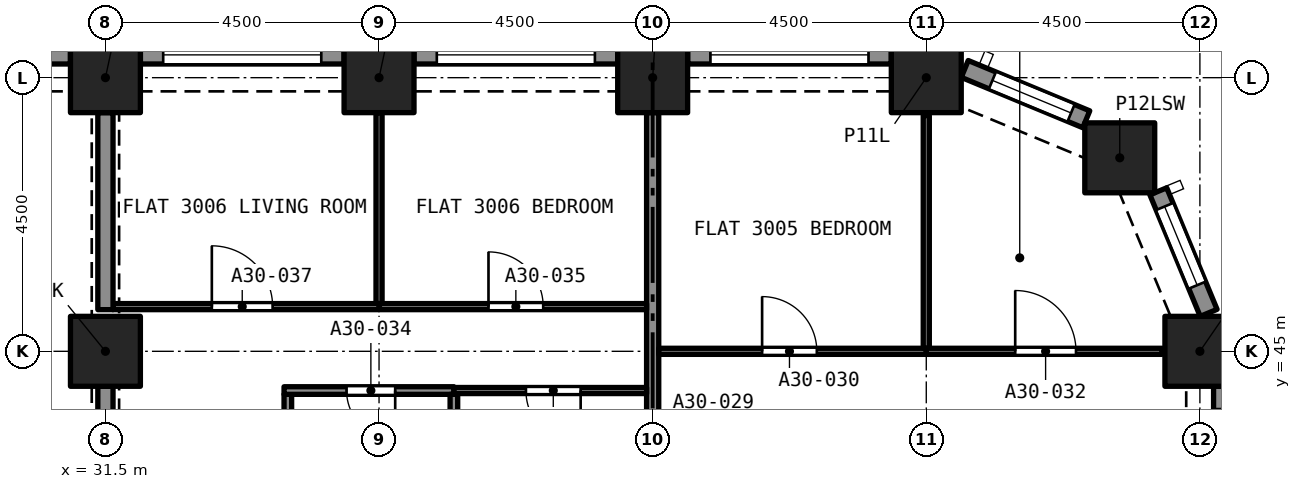
"""IFC4 building model, lengths in metres.
Left out: names, types, materials, properties, quantities, classifications, styles, units other than length and angle.
Written with IfcOpenShell. Run it as: python <this file> out.ifc"""

import sys

from ifc_helpers import new_model, si_unit, direction, frame, frame_2d, origin, origin_2d, place, context, subcontext, project, spatial, rectangle, extrude, element, fill, save


model = new_model("IFC4")
c1 = context("Model", 3, precision=1e-05, world=origin(), true_north=direction((0.0, 1.0)))
c2 = subcontext(c1, "Body", "Model", "MODEL_VIEW")
j1 = project(units=[si_unit("LENGTHUNIT", "METRE"), si_unit("PLANEANGLEUNIT", "RADIAN")], contexts=[c1])
p1 = place(None, origin())
s1 = spatial("IfcSite", under=j1, at=p1, CompositionType="ELEMENT")
p2 = place(p1, origin())
s2 = spatial("IfcBuilding", under=s1, at=p2, CompositionType="ELEMENT")
p3 = place(p2, frame((0.0, 0.0, 108.8)))
s3 = spatial("IfcBuildingStorey", under=s2, at=p3, CompositionType="ELEMENT", Elevation=108.8)
for number, where, z_axis, x_axis in (
    (1, (31.5, 45.0, 0.0), (0.0, 0.0, 1.0), (1.0, 0.0, 0.0)),
    (2, (49.5, 45.0, 0.0), (0.0, 0.0, 1.0), (1.0, 0.0, 0.0)),
    (3, (48.182, 48.182, 0.0), (0.0, 0.0, 1.0), (1.0, 0.0, 0.0)),
    (4, (31.5, 49.5, 0.0), (0.0, 0.0, 1.0), (1.0, 0.0, 0.0)),
    (5, (36.0, 49.5, 0.0), (0.0, 0.0, 1.0), (1.0, 0.0, 0.0)),
    (6, (40.5, 49.5, 0.0), (0.0, 0.0, 1.0), (1.0, 0.0, 0.0)),
    (7, (45.0, 49.5, 0.0), (0.0, 0.0, 1.0), (1.0, 0.0, 0.0)),
):
    element("IfcColumn", number, at=place(p3, frame(where, z_axis=z_axis, x_axis=x_axis)), inside=s3, PredefinedType="COLUMN", context=c2, shape_type="SweptSolid", body=[
        extrude(rectangle(XDim=1.15, YDim=1.15, at=origin_2d()), origin(), (0.0, 0.0, 1.0), 3.2),
    ])
p4 = place(p3, frame((49.875, 44.425, 0.0), z_axis=(0.0, 0.0, 1.0), x_axis=(0.0, -1.0, 0.0)))
e8 = element("IfcWall", 8, at=p4, inside=s3, PredefinedType="SOLIDWALL", context=c2, shape_type="SweptSolid", body=[
    extrude(rectangle(XDim=3.35, YDim=0.3, at=frame_2d((1.675, 0.0))), origin(), (0.0, 0.0, 1.0), 3.2),
])
p5 = place(p4, frame((0.375, 0.0, 0.45)))
e9 = element("IfcOpeningElement", 9, at=p5, cuts=e8, PredefinedType="OPENING", context=c2, shape_type="SweptSolid", body=[
    extrude(rectangle(XDim=2.6, YDim=1.95, at=frame_2d((1.3, 0.975))), frame((0.0, 0.16, 0.0), z_axis=(0.0, -1.0, 0.0), x_axis=(1.0, 0.0, 0.0)), (0.0, 0.0, 1.0), 0.32),
])
p6 = place(p3, frame((48.816, 47.631, 0.0), z_axis=(0.0, 0.0, 1.0), x_axis=(0.382723818695, -0.923862802911, 0.0)))
e10 = element("IfcWall", 10, at=p6, inside=s3, PredefinedType="SOLIDWALL", context=c2, shape_type="SweptSolid", body=[
    extrude(rectangle(XDim=2.164, YDim=0.3, at=frame_2d((1.082, 0.0))), origin(), (0.0, 0.0, 1.0), 3.2),
])
p7 = place(p6, frame((0.271, 0.0, 0.45)))
e11 = element("IfcOpeningElement", 11, at=p7, cuts=e10, PredefinedType="OPENING", context=c2, shape_type="SweptSolid", body=[
    extrude(rectangle(XDim=1.4, YDim=1.95, at=frame_2d((0.7, 0.975))), frame((0.0, 0.16, 0.0), z_axis=(0.0, -1.0, 0.0), x_axis=(1.0, 0.0, 0.0)), (0.0, 0.0, 1.0), 0.32),
])
p8 = place(p3, frame((45.632, 49.644, 0.0), z_axis=(0.0, 0.0, 1.0), x_axis=(0.923862802911, -0.382723818695, 0.0)))
e12 = element("IfcWall", 12, at=p8, inside=s3, PredefinedType="SOLIDWALL", context=c2, shape_type="SweptSolid", body=[
    extrude(rectangle(XDim=2.164, YDim=0.3, at=frame_2d((1.082, 0.0))), origin(), (0.0, 0.0, 1.0), 3.2),
])
p9 = place(p8, frame((0.493, 0.0, 0.45)))
e13 = element("IfcOpeningElement", 13, at=p9, cuts=e12, PredefinedType="OPENING", context=c2, shape_type="SweptSolid", body=[
    extrude(rectangle(XDim=1.4, YDim=1.95, at=frame_2d((0.7, 0.975))), frame((0.0, 0.16, 0.0), z_axis=(0.0, -1.0, 0.0), x_axis=(1.0, 0.0, 0.0)), (0.0, 0.0, 1.0), 0.32),
])
p10 = place(p3, frame((41.075, 49.875, 0.0), z_axis=(0.0, 0.0, 1.0), x_axis=(1.0, 0.0, 0.0)))
e14 = element("IfcWall", 14, at=p10, inside=s3, PredefinedType="SOLIDWALL", context=c2, shape_type="SweptSolid", body=[
    extrude(rectangle(XDim=3.35, YDim=0.3, at=frame_2d((1.675, 0.0))), origin(), (0.0, 0.0, 1.0), 3.2),
])
p11 = place(p10, frame((0.375, 0.0, 0.45)))
e15 = element("IfcOpeningElement", 15, at=p11, cuts=e14, PredefinedType="OPENING", context=c2, shape_type="SweptSolid", body=[
    extrude(rectangle(XDim=2.6, YDim=1.95, at=frame_2d((1.3, 0.975))), frame((0.0, 0.16, 0.0), z_axis=(0.0, -1.0, 0.0), x_axis=(1.0, 0.0, 0.0)), (0.0, 0.0, 1.0), 0.32),
])
p12 = place(p3, frame((36.575, 49.875, 0.0), z_axis=(0.0, 0.0, 1.0), x_axis=(1.0, 0.0, 0.0)))
e16 = element("IfcWall", 16, at=p12, inside=s3, PredefinedType="SOLIDWALL", context=c2, shape_type="SweptSolid", body=[
    extrude(rectangle(XDim=3.35, YDim=0.3, at=frame_2d((1.675, 0.0))), origin(), (0.0, 0.0, 1.0), 3.2),
])
p13 = place(p12, frame((0.375, 0.0, 0.45)))
e17 = element("IfcOpeningElement", 17, at=p13, cuts=e16, PredefinedType="OPENING", context=c2, shape_type="SweptSolid", body=[
    extrude(rectangle(XDim=2.6, YDim=1.95, at=frame_2d((1.3, 0.975))), frame((0.0, 0.16, 0.0), z_axis=(0.0, -1.0, 0.0), x_axis=(1.0, 0.0, 0.0)), (0.0, 0.0, 1.0), 0.32),
])
p14 = place(p3, frame((32.075, 49.875, 0.0), z_axis=(0.0, 0.0, 1.0), x_axis=(1.0, 0.0, 0.0)))
e18 = element("IfcWall", 18, at=p14, inside=s3, PredefinedType="SOLIDWALL", context=c2, shape_type="SweptSolid", body=[
    extrude(rectangle(XDim=3.35, YDim=0.3, at=frame_2d((1.675, 0.0))), origin(), (0.0, 0.0, 1.0), 3.2),
])
p15 = place(p14, frame((0.375, 0.0, 0.45)))
e19 = element("IfcOpeningElement", 19, at=p15, cuts=e18, PredefinedType="OPENING", context=c2, shape_type="SweptSolid", body=[
    extrude(rectangle(XDim=2.6, YDim=1.95, at=frame_2d((1.3, 0.975))), frame((0.0, 0.16, 0.0), z_axis=(0.0, -1.0, 0.0), x_axis=(1.0, 0.0, 0.0)), (0.0, 0.0, 1.0), 0.32),
])
p16 = place(p3, frame((27.575, 49.875, 0.0), z_axis=(0.0, 0.0, 1.0), x_axis=(1.0, 0.0, 0.0)))
e20 = element("IfcWall", 20, at=p16, inside=s3, PredefinedType="SOLIDWALL", context=c2, shape_type="SweptSolid", body=[
    extrude(rectangle(XDim=3.35, YDim=0.3, at=frame_2d((1.675, 0.0))), origin(), (0.0, 0.0, 1.0), 3.2),
])
p17 = place(p16, frame((0.375, 0.0, 0.45)))
e21 = element("IfcOpeningElement", 21, at=p17, cuts=e20, PredefinedType="OPENING", context=c2, shape_type="SweptSolid", body=[
    extrude(rectangle(XDim=2.6, YDim=1.95, at=frame_2d((1.3, 0.975))), frame((0.0, 0.16, 0.0), z_axis=(0.0, -1.0, 0.0), x_axis=(1.0, 0.0, 0.0)), (0.0, 0.0, 1.0), 0.32),
])
p18 = place(p3, frame((40.5, 40.35, 0.0), z_axis=(0.0, 0.0, 1.0), x_axis=(0.0, 1.0, 0.0)))
e22 = element("IfcWall", 22, at=p18, inside=s3, PredefinedType="PARTITIONING", context=c2, shape_type="SweptSolid", body=[
    extrude(rectangle(XDim=8.575, YDim=0.2, at=frame_2d((4.288, 0.0))), origin(), (0.0, 0.0, 1.0), 2.9),
])
p19 = place(p3, frame((40.6, 45.0, 0.0), z_axis=(0.0, 0.0, 1.0), x_axis=(1.0, 0.0, 0.0)))
e23 = element("IfcWall", 23, at=p19, inside=s3, PredefinedType="PARTITIONING", context=c2, shape_type="SweptSolid", body=[
    extrude(rectangle(XDim=4.4, YDim=0.1, at=frame_2d((2.2, 0.0))), origin(), (0.0, 0.0, 1.0), 2.9),
])
p20 = place(p19, frame((1.7, 0.0, 0.0)))
e24 = element("IfcOpeningElement", 24, at=p20, cuts=e23, PredefinedType="OPENING", context=c2, shape_type="SweptSolid", body=[
    extrude(rectangle(XDim=0.9, YDim=2.1, at=frame_2d((0.45, 1.05))), frame((0.0, 0.06, 0.0), z_axis=(0.0, -1.0, 0.0), x_axis=(1.0, 0.0, 0.0)), (0.0, 0.0, 1.0), 0.12),
])
p21 = place(p3, frame((45.0, 45.05, 0.0), z_axis=(0.0, 0.0, 1.0), x_axis=(0.0, 1.0, 0.0)))
e25 = element("IfcWall", 25, at=p21, inside=s3, PredefinedType="PARTITIONING", context=c2, shape_type="SweptSolid", body=[
    extrude(rectangle(XDim=3.828, YDim=0.1, at=frame_2d((1.914, 0.0))), origin(), (0.0, 0.0, 1.0), 2.9),
])
p22 = place(p3, frame((45.0, 45.0, 0.0), z_axis=(0.0, 0.0, 1.0), x_axis=(1.0, 0.0, 0.0)))
e26 = element("IfcWall", 26, at=p22, inside=s3, PredefinedType="PARTITIONING", context=c2, shape_type="SweptSolid", body=[
    extrude(rectangle(XDim=3.878, YDim=0.1, at=frame_2d((1.939, 0.0))), origin(), (0.0, 0.0, 1.0), 2.9),
])
p23 = place(p22, frame((1.462, 0.0, 0.0)))
e27 = element("IfcOpeningElement", 27, at=p23, cuts=e26, PredefinedType="OPENING", context=c2, shape_type="SweptSolid", body=[
    extrude(rectangle(XDim=1.0, YDim=2.1, at=frame_2d((0.5, 1.05))), frame((0.0, 0.06, 0.0), z_axis=(0.0, -1.0, 0.0), x_axis=(1.0, 0.0, 0.0)), (0.0, 0.0, 1.0), 0.12),
])
p24 = place(p3, frame((34.5, 40.425, 0.0), z_axis=(0.0, 0.0, 1.0), x_axis=(0.0, 1.0, 0.0)))
e28 = element("IfcWall", 28, at=p24, inside=s3, PredefinedType="PARTITIONING", context=c2, shape_type="SweptSolid", body=[
    extrude(rectangle(XDim=3.867, YDim=0.125, at=frame_2d((1.934, 0.0))), origin(), (0.0, 0.0, 1.0), 2.9),
])
p25 = place(p3, frame((37.231, 44.355, 0.0), z_axis=(0.0, 0.0, 1.0), x_axis=(-1.0, 0.0, 0.0)))
e29 = element("IfcWall", 29, at=p25, inside=s3, PredefinedType="PARTITIONING", context=c2, shape_type="SweptSolid", body=[
    extrude(rectangle(XDim=2.794, YDim=0.125, at=frame_2d((1.397, 0.0))), origin(), (0.0, 0.0, 1.0), 2.9),
])
p26 = place(p25, frame((0.966, 0.0, 0.0)))
e30 = element("IfcOpeningElement", 30, at=p26, cuts=e29, PredefinedType="OPENING", context=c2, shape_type="SweptSolid", body=[
    extrude(rectangle(XDim=0.8, YDim=2.1, at=frame_2d((0.4, 1.05))), frame((0.0, 0.073, 0.0), z_axis=(0.0, -1.0, 0.0), x_axis=(1.0, 0.0, 0.0)), (0.0, 0.0, 1.0), 0.145),
])
p27 = place(p3, frame((37.231, 40.35, 0.0), z_axis=(0.0, 0.0, 1.0), x_axis=(0.0, 1.0, 0.0)))
e31 = element("IfcWall", 31, at=p27, inside=s3, PredefinedType="PARTITIONING", context=c2, shape_type="SweptSolid", body=[
    extrude(rectangle(XDim=3.942, YDim=0.125, at=frame_2d((1.971, 0.0))), origin(), (0.0, 0.0, 1.0), 2.9),
])
p28 = place(p3, frame((36.0, 45.735, 0.0), z_axis=(0.0, 0.0, 1.0), x_axis=(1.0, 0.0, 0.0)))
e32 = element("IfcWall", 32, at=p28, inside=s3, PredefinedType="PARTITIONING", context=c2, shape_type="SweptSolid", body=[
    extrude(rectangle(XDim=4.4, YDim=0.1, at=frame_2d((2.2, 0.0))), origin(), (0.0, 0.0, 1.0), 2.9),
])
p29 = place(p28, frame((1.8, 0.0, 0.0)))
e33 = element("IfcOpeningElement", 33, at=p29, cuts=e32, PredefinedType="OPENING", context=c2, shape_type="SweptSolid", body=[
    extrude(rectangle(XDim=0.9, YDim=2.1, at=frame_2d((0.45, 1.05))), frame((0.0, 0.06, 0.0), z_axis=(0.0, -1.0, 0.0), x_axis=(1.0, 0.0, 0.0)), (0.0, 0.0, 1.0), 0.12),
])
p30 = place(p3, frame((36.0, 45.785, 0.0), z_axis=(0.0, 0.0, 1.0), x_axis=(0.0, 1.0, 0.0)))
e34 = element("IfcWall", 34, at=p30, inside=s3, PredefinedType="PARTITIONING", context=c2, shape_type="SweptSolid", body=[
    extrude(rectangle(XDim=3.14, YDim=0.1, at=frame_2d((1.57, 0.0))), origin(), (0.0, 0.0, 1.0), 2.9),
])
p31 = place(p3, frame((40.4, 44.355, 0.0), z_axis=(0.0, 0.0, 1.0), x_axis=(-1.0, 0.0, 0.0)))
e35 = element("IfcWall", 35, at=p31, inside=s3, PredefinedType="PARTITIONING", context=c2, shape_type="SweptSolid", body=[
    extrude(rectangle(XDim=3.168, YDim=0.1, at=frame_2d((1.584, 0.0))), origin(), (0.0, 0.0, 1.0), 2.9),
])
p32 = place(p31, frame((1.084, 0.0, 0.0)))
e36 = element("IfcOpeningElement", 36, at=p32, cuts=e35, PredefinedType="OPENING", context=c2, shape_type="SweptSolid", body=[
    extrude(rectangle(XDim=0.9, YDim=2.1, at=frame_2d((0.45, 1.05))), frame((0.0, 0.06, 0.0), z_axis=(0.0, -1.0, 0.0), x_axis=(1.0, 0.0, 0.0)), (0.0, 0.0, 1.0), 0.12),
])
p33 = place(p3, frame((31.625, 45.735, 0.0), z_axis=(0.0, 0.0, 1.0), x_axis=(1.0, 0.0, 0.0)))
e37 = element("IfcWall", 37, at=p33, inside=s3, PredefinedType="PARTITIONING", context=c2, shape_type="SweptSolid", body=[
    extrude(rectangle(XDim=4.375, YDim=0.1, at=frame_2d((2.188, 0.0))), origin(), (0.0, 0.0, 1.0), 2.9),
])
p34 = place(p33, frame((1.625, 0.0, 0.0)))
e38 = element("IfcOpeningElement", 38, at=p34, cuts=e37, PredefinedType="OPENING", context=c2, shape_type="SweptSolid", body=[
    extrude(rectangle(XDim=1.0, YDim=2.1, at=frame_2d((0.5, 1.05))), frame((0.0, 0.06, 0.0), z_axis=(0.0, -1.0, 0.0), x_axis=(1.0, 0.0, 0.0)), (0.0, 0.0, 1.0), 0.12),
])
p35 = place(p3, frame((31.5, 41.075, 0.0), z_axis=(0.0, 0.0, 1.0), x_axis=(0.0, 1.0, 0.0)))
e39 = element("IfcWall", 39, at=p35, inside=s3, PredefinedType="PARTITIONING", context=c2, shape_type="SweptSolid", body=[
    extrude(rectangle(XDim=3.35, YDim=0.25, at=frame_2d((1.675, 0.0))), origin(), (0.0, 0.0, 1.0), 2.38),
])
p36 = place(p3, frame((31.5, 45.685, 0.0), z_axis=(0.0, 0.0, 1.0), x_axis=(0.0, 1.0, 0.0)))
e40 = element("IfcWall", 40, at=p36, inside=s3, PredefinedType="PARTITIONING", context=c2, shape_type="SweptSolid", body=[
    extrude(rectangle(XDim=3.24, YDim=0.25, at=frame_2d((1.62, 0.0))), origin(), (0.0, 0.0, 1.0), 2.38),
])
p37 = place(p7, origin())
e41 = element("IfcWindow", 41, at=p37, inside=s3, PartitioningType="SINGLE_PANEL", PredefinedType="WINDOW", context=c2, shape_type="SweptSolid", body=[
    extrude(rectangle(XDim=1.4, YDim=1.95, at=frame_2d((0.7, 0.975))), frame((0.0, 0.03, 0.0), z_axis=(0.0, -1.0, 0.0), x_axis=(1.0, 0.0, 0.0)), (0.0, 0.0, 1.0), 0.06),
])
fill(e11, e41)
p38 = place(p9, origin())
e42 = element("IfcWindow", 42, at=p38, inside=s3, PartitioningType="SINGLE_PANEL", PredefinedType="WINDOW", context=c2, shape_type="SweptSolid", body=[
    extrude(rectangle(XDim=1.4, YDim=1.95, at=frame_2d((0.7, 0.975))), frame((0.0, 0.03, 0.0), z_axis=(0.0, -1.0, 0.0), x_axis=(1.0, 0.0, 0.0)), (0.0, 0.0, 1.0), 0.06),
])
fill(e13, e42)
p39 = place(p11, origin())
e43 = element("IfcWindow", 43, at=p39, inside=s3, PartitioningType="SINGLE_PANEL", PredefinedType="WINDOW", context=c2, shape_type="SweptSolid", body=[
    extrude(rectangle(XDim=2.6, YDim=1.95, at=frame_2d((1.3, 0.975))), frame((0.0, 0.03, 0.0), z_axis=(0.0, -1.0, 0.0), x_axis=(1.0, 0.0, 0.0)), (0.0, 0.0, 1.0), 0.06),
])
fill(e15, e43)
p40 = place(p13, origin())
e44 = element("IfcWindow", 44, at=p40, inside=s3, PartitioningType="SINGLE_PANEL", PredefinedType="WINDOW", context=c2, shape_type="SweptSolid", body=[
    extrude(rectangle(XDim=2.6, YDim=1.95, at=frame_2d((1.3, 0.975))), frame((0.0, 0.03, 0.0), z_axis=(0.0, -1.0, 0.0), x_axis=(1.0, 0.0, 0.0)), (0.0, 0.0, 1.0), 0.06),
])
fill(e17, e44)
p41 = place(p15, origin())
e45 = element("IfcWindow", 45, at=p41, inside=s3, PartitioningType="SINGLE_PANEL", PredefinedType="WINDOW", context=c2, shape_type="SweptSolid", body=[
    extrude(rectangle(XDim=2.6, YDim=1.95, at=frame_2d((1.3, 0.975))), frame((0.0, 0.03, 0.0), z_axis=(0.0, -1.0, 0.0), x_axis=(1.0, 0.0, 0.0)), (0.0, 0.0, 1.0), 0.06),
])
fill(e19, e45)
p42 = place(p20, origin())
e46 = element("IfcDoor", 46, at=p42, inside=s3, OperationType="SINGLE_SWING_LEFT", PredefinedType="DOOR", context=c2, shape_type="SweptSolid", body=[
    extrude(rectangle(XDim=0.9, YDim=2.1, at=frame_2d((0.45, 1.05))), frame((0.0, 0.025, 0.0), z_axis=(0.0, -1.0, 0.0), x_axis=(1.0, 0.0, 0.0)), (0.0, 0.0, 1.0), 0.05),
])
fill(e24, e46)
p43 = place(p23, origin())
e47 = element("IfcDoor", 47, at=p43, inside=s3, OperationType="SINGLE_SWING_RIGHT", PredefinedType="DOOR", context=c2, shape_type="SweptSolid", body=[
    extrude(rectangle(XDim=1.0, YDim=2.1, at=frame_2d((0.5, 1.05))), frame((0.0, 0.025, 0.0), z_axis=(0.0, -1.0, 0.0), x_axis=(1.0, 0.0, 0.0)), (0.0, 0.0, 1.0), 0.05),
])
fill(e27, e47)
p44 = place(p26, origin())
e48 = element("IfcDoor", 48, at=p44, inside=s3, OperationType="SINGLE_SWING_LEFT", PredefinedType="DOOR", context=c2, shape_type="SweptSolid", body=[
    extrude(rectangle(XDim=0.8, YDim=2.1, at=frame_2d((0.4, 1.05))), frame((0.0, 0.025, 0.0), z_axis=(0.0, -1.0, 0.0), x_axis=(1.0, 0.0, 0.0)), (0.0, 0.0, 1.0), 0.05),
])
fill(e30, e48)
p45 = place(p29, origin())
e49 = element("IfcDoor", 49, at=p45, inside=s3, OperationType="SINGLE_SWING_RIGHT", PredefinedType="DOOR", context=c2, shape_type="SweptSolid", body=[
    extrude(rectangle(XDim=0.9, YDim=2.1, at=frame_2d((0.45, 1.05))), frame((0.0, 0.025, 0.0), z_axis=(0.0, -1.0, 0.0), x_axis=(1.0, 0.0, 0.0)), (0.0, 0.0, 1.0), 0.05),
])
fill(e33, e49)
p46 = place(p32, origin())
e50 = element("IfcDoor", 50, at=p46, inside=s3, OperationType="SINGLE_SWING_LEFT", PredefinedType="DOOR", context=c2, shape_type="SweptSolid", body=[
    extrude(rectangle(XDim=0.9, YDim=2.1, at=frame_2d((0.45, 1.05))), frame((0.0, 0.025, 0.0), z_axis=(0.0, -1.0, 0.0), x_axis=(1.0, 0.0, 0.0)), (0.0, 0.0, 1.0), 0.05),
])
fill(e36, e50)
p47 = place(p34, origin())
e51 = element("IfcDoor", 51, at=p47, inside=s3, OperationType="SINGLE_SWING_LEFT", PredefinedType="DOOR", context=c2, shape_type="SweptSolid", body=[
    extrude(rectangle(XDim=1.0, YDim=2.1, at=frame_2d((0.5, 1.05))), frame((0.0, 0.025, 0.0), z_axis=(0.0, -1.0, 0.0), x_axis=(1.0, 0.0, 0.0)), (0.0, 0.0, 1.0), 0.05),
])
fill(e38, e51)
save(model, sys.argv[1])
